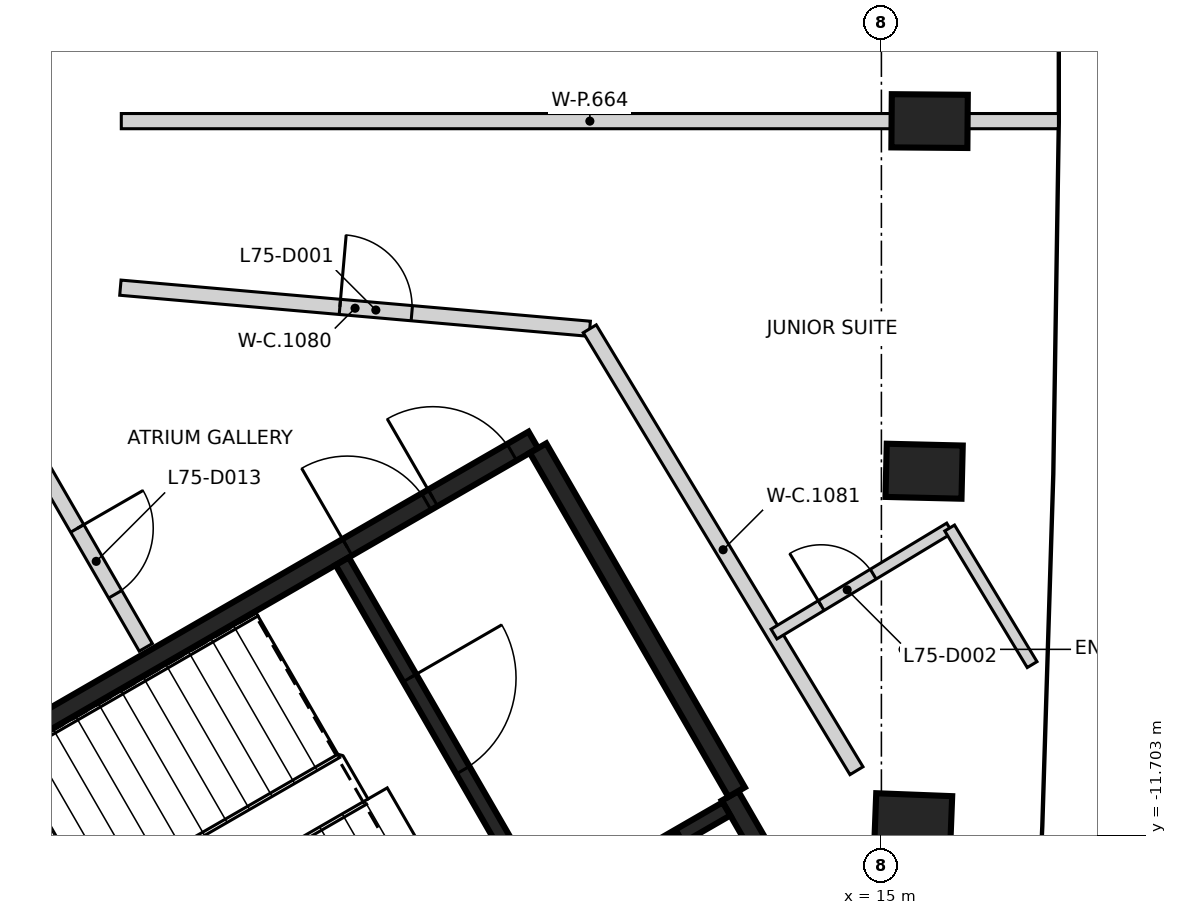
"""IFC4 building model, lengths in metres.
Left out: names, types, materials, properties, quantities, classifications, styles, units other than length and angle.
Written with IfcOpenShell. Run it as: python <this file> out.ifc"""

import sys

from ifc_helpers import new_model, si_unit, direction, frame, frame_2d, origin, origin_2d, place, context, subcontext, project, spatial, rectangle, extrude, element, fill, save


model = new_model("IFC4")
c1 = context("Model", 3, precision=1e-05, world=origin(), true_north=direction((0.0, 1.0)))
c2 = subcontext(c1, "Body", "Model", "MODEL_VIEW")
j1 = project(units=[si_unit("LENGTHUNIT", "METRE"), si_unit("PLANEANGLEUNIT", "RADIAN")], contexts=[c1])
p1 = place(None, origin())
s1 = spatial("IfcSite", under=j1, at=p1, CompositionType="ELEMENT")
p2 = place(p1, origin())
s2 = spatial("IfcBuilding", under=s1, at=p2, CompositionType="ELEMENT")
p3 = place(p2, frame((0.0, 0.0, 298.2)))
s3 = spatial("IfcBuildingStorey", under=s2, at=p3, CompositionType="ELEMENT", Elevation=298.2)
for number, where, z_axis, x_axis in (
    (1, (15.418, -11.515, -0.35), (0.0, 0.0, 1.0), (-0.999, 0.039, 0.0)),
    (2, (15.562, -6.91, -0.35), (0.0, 0.0, 1.0), (-1.0, 0.024, 0.0)),
    (3, (15.634, -2.303, -0.35), (0.0, 0.0, 1.0), (-1.0, 0.008, 0.0)),
):
    element("IfcColumn", number, at=place(p3, frame(where, z_axis=z_axis, x_axis=x_axis)), inside=s3, PredefinedType="COLUMN", context=c2, shape_type="SweptSolid", body=[
        extrude(rectangle(XDim=1.0, YDim=0.7, at=origin_2d()), origin(), (0.0, 0.0, 1.0), 2.64),
    ])
p4 = place(p3, frame((0.417, -12.273, 0.0), z_axis=(0.0, 0.0, 1.0), x_axis=(0.866021906294, 0.500006057782, 0.0)))
e4 = element("IfcWall", 4, at=p4, inside=s3, PredefinedType="SHEAR", context=c2, shape_type="SweptSolid", body=[
    extrude(rectangle(XDim=11.55, YDim=0.25, at=frame_2d((5.775, 0.0))), origin(), (0.0, 0.0, 1.0), 3.2),
])
p5 = place(p4, frame((10.025, 0.0, 0.0)))
e5 = element("IfcOpeningElement", 5, at=p5, cuts=e4, PredefinedType="OPENING", context=c2, shape_type="SweptSolid", body=[
    extrude(rectangle(XDim=1.2, YDim=2.1, at=frame_2d((0.6, 1.05))), frame((0.0, 0.135, 0.0), z_axis=(0.0, -1.0, 0.0), x_axis=(1.0, 0.0, 0.0)), (0.0, 0.0, 1.0), 0.27),
])
p6 = place(p4, frame((8.725, 0.0, 0.0)))
e6 = element("IfcOpeningElement", 6, at=p6, cuts=e4, PredefinedType="OPENING", context=c2, shape_type="SweptSolid", body=[
    extrude(rectangle(XDim=1.2, YDim=2.1, at=frame_2d((0.6, 1.05))), frame((0.0, 0.135, 0.0), z_axis=(0.0, -1.0, 0.0), x_axis=(1.0, 0.0, 0.0)), (0.0, 0.0, 1.0), 0.27),
])
p7 = place(p3, frame((13.008, -11.181, 0.0), z_axis=(0.0, 0.0, 1.0), x_axis=(0.500001955336, -0.866024274868, 0.0)))
e7 = element("IfcWall", 7, at=p7, inside=s3, PredefinedType="SHEAR", context=c2, shape_type="SweptSolid", body=[
    extrude(rectangle(XDim=6.125, YDim=0.25, at=frame_2d((3.062, 0.0))), origin(), (0.0, 0.0, 1.0), 3.2),
])
p8 = place(p7, frame((3.563, 0.0, 0.0)))
e8 = element("IfcOpeningElement", 8, at=p8, cuts=e7, PredefinedType="OPENING", context=c2, shape_type="SweptSolid", body=[
    extrude(rectangle(XDim=1.0, YDim=2.1, at=frame_2d((0.5, 1.05))), frame((0.0, 0.135, 0.0), z_axis=(0.0, -1.0, 0.0), x_axis=(1.0, 0.0, 0.0)), (0.0, 0.0, 1.0), 0.27),
])
p9 = place(p3, frame((10.483, -6.606, 0.0), z_axis=(0.0, 0.0, 1.0), x_axis=(0.49999885962, -0.866026062182, 0.0)))
e9 = element("IfcWall", 9, at=p9, inside=s3, PredefinedType="SHEAR", context=c2, shape_type="SweptSolid", body=[
    extrude(rectangle(XDim=5.225, YDim=0.25, at=frame_2d((2.612, 0.0))), origin(), (0.0, 0.0, 1.0), 3.2),
])
p10 = place(p3, frame((7.906, -8.094, 0.0), z_axis=(0.0, 0.0, 1.0), x_axis=(0.500027839223, -0.866009330205, 0.0)))
e10 = element("IfcWall", 10, at=p10, inside=s3, PredefinedType="SHEAR", context=c2, shape_type="SweptSolid", body=[
    extrude(rectangle(XDim=5.098, YDim=0.2, at=frame_2d((2.549, 0.0))), origin(), (0.0, 0.0, 1.0), 3.2),
])
p11 = place(p10, frame((1.774, 0.0, 0.0)))
e11 = element("IfcOpeningElement", 11, at=p11, cuts=e10, PredefinedType="OPENING", context=c2, shape_type="SweptSolid", body=[
    extrude(rectangle(XDim=1.4, YDim=2.1, at=frame_2d((0.7, 1.05))), frame((0.0, 0.11, 0.0), z_axis=(0.0, -1.0, 0.0), x_axis=(1.0, 0.0, 0.0)), (0.0, 0.0, 1.0), 0.22),
])
p12 = place(p3, frame((10.666, -12.678, 0.0), z_axis=(0.0, 0.0, 1.0), x_axis=(0.866018407898, 0.500012117035, 0.0)))
e12 = element("IfcWall", 12, at=p12, inside=s3, PredefinedType="SHEAR", context=c2, shape_type="SweptSolid", body=[
    extrude(rectangle(XDim=2.651, YDim=0.2, at=frame_2d((1.325, 0.0))), origin(), (0.0, 0.0, 1.0), 3.2),
])
p13 = place(p12, frame((0.652, 0.0, 0.0)))
e13 = element("IfcOpeningElement", 13, at=p13, cuts=e12, PredefinedType="OPENING", context=c2, shape_type="SweptSolid", body=[
    extrude(rectangle(XDim=1.3, YDim=2.1, at=frame_2d((0.65, 1.05))), frame((0.0, 0.11, 0.0), z_axis=(0.0, -1.0, 0.0), x_axis=(1.0, 0.0, 0.0)), (0.0, 0.0, 1.0), 0.22),
])
p14 = place(p3, frame((3.987, -6.911, 0.0), z_axis=(0.0, 0.0, 1.0), x_axis=(0.499458942258, -0.866337558345, 0.0)))
e14 = element("IfcWall", 14, at=p14, inside=s3, PredefinedType="PARTITIONING", context=c2, shape_type="SweptSolid", body=[
    extrude(rectangle(XDim=2.674, YDim=0.2, at=frame_2d((1.337, 0.0))), origin(), (0.0, 0.0, 1.0), 3.2),
])
p15 = place(p14, frame((0.867, 0.0, 0.0)))
e15 = element("IfcOpeningElement", 15, at=p15, cuts=e14, PredefinedType="OPENING", context=c2, shape_type="SweptSolid", body=[
    extrude(rectangle(XDim=1.0, YDim=2.1, at=frame_2d((0.5, 1.05))), frame((0.0, 0.11, 0.0), z_axis=(0.0, -1.0, 0.0), x_axis=(1.0, 0.0, 0.0)), (0.0, 0.0, 1.0), 0.22),
])
p16 = place(p3, frame((4.988, -4.495, 0.0), z_axis=(0.0, 0.0, 1.0), x_axis=(0.996187344936, -0.087239748904, 0.0)))
e16 = element("IfcWall", 16, at=p16, inside=s3, PredefinedType="PARTITIONING", context=c2, shape_type="SweptSolid", body=[
    extrude(rectangle(XDim=6.199, YDim=0.2, at=frame_2d((3.099, 0.0))), origin(), (0.0, 0.0, 1.0), 3.2),
])
p17 = place(p16, frame((2.899, 0.0, 0.0)))
e17 = element("IfcOpeningElement", 17, at=p17, cuts=e16, PredefinedType="OPENING", context=c2, shape_type="SweptSolid", body=[
    extrude(rectangle(XDim=0.95, YDim=2.1, at=frame_2d((0.475, 1.05))), frame((0.0, 0.11, 0.0), z_axis=(0.0, -1.0, 0.0), x_axis=(1.0, 0.0, 0.0)), (0.0, 0.0, 1.0), 0.22),
])
p18 = place(p3, frame((11.163, -5.036, 0.0), z_axis=(0.0, 0.0, 1.0), x_axis=(0.516730398198, -0.856148173845, 0.0)))
e18 = element("IfcWall", 18, at=p18, inside=s3, PredefinedType="PARTITIONING", context=c2, shape_type="SweptSolid", body=[
    extrude(rectangle(XDim=6.791, YDim=0.2, at=frame_2d((3.396, 0.0))), origin(), (0.0, 0.0, 1.0), 3.2),
])
p19 = place(p3, frame((5.0, -2.304, 0.0), z_axis=(0.0, 0.0, 1.0), x_axis=(1.0, 0.0, 0.0)))
e19 = element("IfcWall", 19, at=p19, inside=s3, PredefinedType="PARTITIONING", context=c2, shape_type="SweptSolid", body=[
    extrude(rectangle(XDim=12.329, YDim=0.2, at=frame_2d((6.165, 0.0))), origin(), (0.0, 0.0, 1.0), 3.2),
])
p20 = place(p3, frame((13.587, -9.052, 0.0), z_axis=(0.0, 0.0, 1.0), x_axis=(0.856117294569, 0.516781557275, 0.0)))
e20 = element("IfcWall", 20, at=p20, inside=s3, PredefinedType="PARTITIONING", context=c2, shape_type="SweptSolid", body=[
    extrude(rectangle(XDim=2.699, YDim=0.15, at=frame_2d((1.35, 0.0))), origin(), (0.0, 0.0, 1.0), 2.29),
])
p21 = place(p20, frame((0.725, 0.0, 0.0)))
e21 = element("IfcOpeningElement", 21, at=p21, cuts=e20, PredefinedType="OPENING", context=c2, shape_type="SweptSolid", body=[
    extrude(rectangle(XDim=0.8, YDim=2.1, at=frame_2d((0.4, 1.05))), frame((0.0, 0.085, 0.0), z_axis=(0.0, -1.0, 0.0), x_axis=(1.0, 0.0, 0.0)), (0.0, 0.0, 1.0), 0.17),
])
p22 = place(p3, frame((15.898, -7.657, 0.0), z_axis=(0.0, 0.0, 1.0), x_axis=(0.516836936411, -0.856083863393, 0.0)))
e22 = element("IfcWall", 22, at=p22, inside=s3, PredefinedType="PARTITIONING", context=c2, shape_type="SweptSolid", body=[
    extrude(rectangle(XDim=2.099, YDim=0.15, at=frame_2d((1.05, 0.0))), origin(), (0.0, 0.0, 1.0), 3.2),
])
p23 = place(p13, origin())
e23 = element("IfcDoor", 23, at=p23, inside=s3, OperationType="SLIDING_TO_RIGHT", PredefinedType="DOOR", context=c2, shape_type="SweptSolid", body=[
    extrude(rectangle(XDim=1.3, YDim=2.1, at=frame_2d((0.65, 1.05))), frame((0.0, 0.025, 0.0), z_axis=(0.0, -1.0, 0.0), x_axis=(1.0, 0.0, 0.0)), (0.0, 0.0, 1.0), 0.05),
])
fill(e13, e23)
p24 = place(p5, origin())
e24 = element("IfcDoor", 24, at=p24, inside=s3, OperationType="SINGLE_SWING_LEFT", PredefinedType="DOOR", context=c2, shape_type="SweptSolid", body=[
    extrude(rectangle(XDim=1.2, YDim=2.1, at=frame_2d((0.6, 1.05))), frame((0.0, 0.025, 0.0), z_axis=(0.0, -1.0, 0.0), x_axis=(1.0, 0.0, 0.0)), (0.0, 0.0, 1.0), 0.05),
])
fill(e5, e24)
p25 = place(p6, origin())
e25 = element("IfcDoor", 25, at=p25, inside=s3, OperationType="SINGLE_SWING_RIGHT", PredefinedType="DOOR", context=c2, shape_type="SweptSolid", body=[
    extrude(rectangle(XDim=1.2, YDim=2.1, at=frame_2d((0.6, 1.05))), frame((0.0, 0.025, 0.0), z_axis=(0.0, -1.0, 0.0), x_axis=(1.0, 0.0, 0.0)), (0.0, 0.0, 1.0), 0.05),
])
fill(e6, e25)
p26 = place(p11, origin())
e26 = element("IfcDoor", 26, at=p26, inside=s3, OperationType="SINGLE_SWING_RIGHT", PredefinedType="DOOR", context=c2, shape_type="SweptSolid", body=[
    extrude(rectangle(XDim=1.4, YDim=2.1, at=frame_2d((0.7, 1.05))), frame((0.0, 0.025, 0.0), z_axis=(0.0, -1.0, 0.0), x_axis=(1.0, 0.0, 0.0)), (0.0, 0.0, 1.0), 0.05),
])
fill(e11, e26)
p27 = place(p17, frame((0.95, 0.0, 0.0), z_axis=(0.0, 0.0, 1.0), x_axis=(-1.0, 0.0, 0.0)))
e27 = element("IfcDoor", 27, at=p27, inside=s3, OperationType="SINGLE_SWING_LEFT", PredefinedType="DOOR", context=c2, shape_type="SweptSolid", body=[
    extrude(rectangle(XDim=0.95, YDim=2.1, at=frame_2d((0.475, 1.05))), frame((0.0, 0.025, 0.0), z_axis=(0.0, -1.0, 0.0), x_axis=(1.0, 0.0, 0.0)), (0.0, 0.0, 1.0), 0.05),
])
fill(e17, e27)
p28 = place(p21, origin())
e28 = element("IfcDoor", 28, at=p28, inside=s3, OperationType="SINGLE_SWING_LEFT", PredefinedType="DOOR", context=c2, shape_type="SweptSolid", body=[
    extrude(rectangle(XDim=0.8, YDim=2.1, at=frame_2d((0.4, 1.05))), frame((0.0, 0.025, 0.0), z_axis=(0.0, -1.0, 0.0), x_axis=(1.0, 0.0, 0.0)), (0.0, 0.0, 1.0), 0.05),
])
fill(e21, e28)
p29 = place(p15, frame((1.0, 0.0, 0.0), z_axis=(0.0, 0.0, 1.0), x_axis=(-1.0, 0.0, 0.0)))
e29 = element("IfcDoor", 29, at=p29, inside=s3, OperationType="SINGLE_SWING_LEFT", PredefinedType="DOOR", context=c2, shape_type="SweptSolid", body=[
    extrude(rectangle(XDim=1.0, YDim=2.1, at=frame_2d((0.5, 1.05))), frame((0.0, 0.025, 0.0), z_axis=(0.0, -1.0, 0.0), x_axis=(1.0, 0.0, 0.0)), (0.0, 0.0, 1.0), 0.05),
])
fill(e15, e29)
save(model, sys.argv[1])
